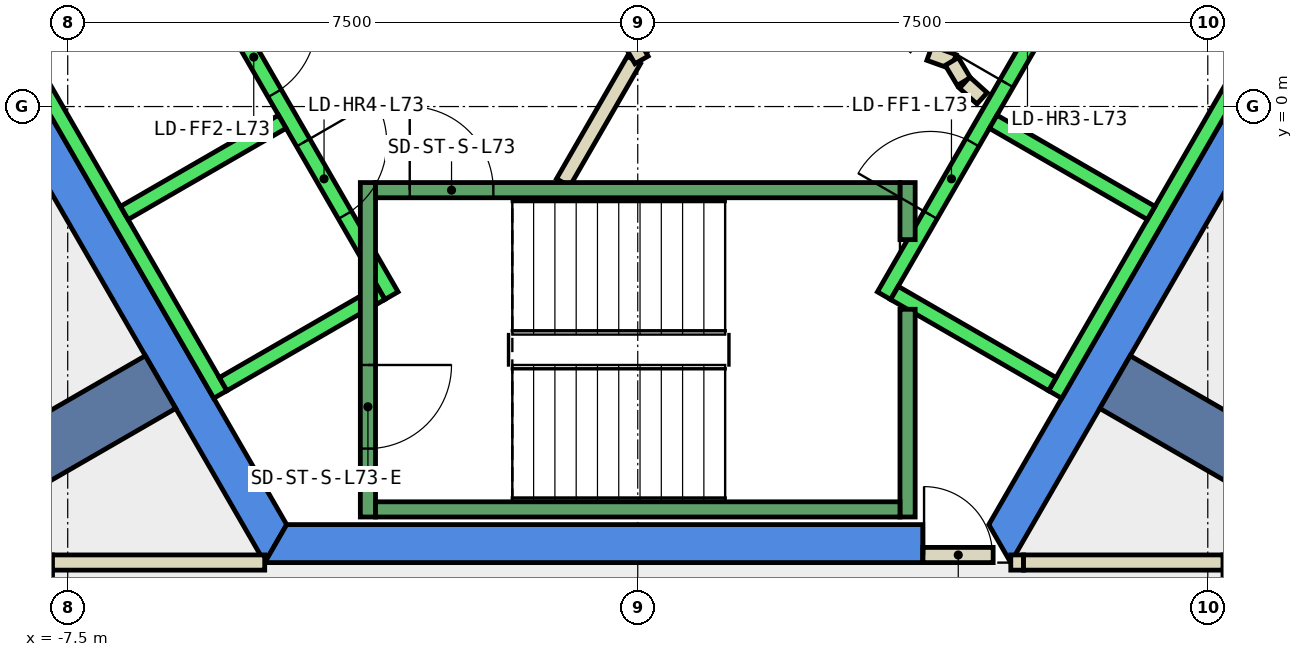
"""IFC4 building model, lengths in metres.
Left out: names, types, materials, properties, quantities, classifications, styles, units other than length and angle.
Written with IfcOpenShell. Run it as: python <this file> out.ifc"""

import sys

from ifc_helpers import new_model, si_unit, direction, frame, frame_2d, origin, place, context, subcontext, project, spatial, polyline, rectangle, outline, extrude, element, fill, save


model = new_model("IFC4")
c1 = context("Model", 3, precision=1e-05, world=origin(), true_north=direction((0.0, 1.0)))
c2 = subcontext(c1, "Body", "Model", "MODEL_VIEW")
j1 = project(units=[si_unit("LENGTHUNIT", "METRE"), si_unit("PLANEANGLEUNIT", "RADIAN")], contexts=[c1])
p1 = place(None, origin())
s1 = spatial("IfcSite", under=j1, at=p1, CompositionType="ELEMENT")
p2 = place(p1, origin())
s2 = spatial("IfcBuilding", under=s1, at=p2, CompositionType="ELEMENT")
p3 = place(p2, frame((0.0, 0.0, 311.6)))
s3 = spatial("IfcBuildingStorey", under=s2, at=p3, CompositionType="ELEMENT", Elevation=311.6)
p4 = place(p3, frame((0.0, 0.0, -0.34)))
e1 = element("IfcWall", 1, at=p4, inside=s3, PredefinedType="SHEAR", context=c2, shape_type="SweptSolid", body=[
    extrude(outline(polyline([(-9.815, 2.5), (-4.907, -6.0), (-4.619, -5.5), (-9.238, 2.5), (-9.815, 2.5)])), origin(), (0.0, 0.0, 1.0), 3.6),
])
p5 = place(p3, frame((0.0, 0.0, -0.34)))
e2 = element("IfcWall", 2, at=p5, inside=s3, PredefinedType="SHEAR", context=c2, shape_type="SweptSolid", body=[
    extrude(outline(polyline([(3.75, -6.0), (3.75, -5.5), (-4.619, -5.5), (-4.907, -6.0), (3.75, -6.0)])), origin(), (0.0, 0.0, 1.0), 3.6),
])
p6 = place(p3, frame((0.0, 0.0, -0.34)))
e3 = element("IfcWall", 3, at=p6, inside=s3, PredefinedType="SHEAR", context=c2, shape_type="SweptSolid", body=[
    extrude(outline(polyline([(4.907, -6.0), (9.815, 2.5), (9.238, 2.5), (4.619, -5.5), (4.907, -6.0)])), origin(), (0.0, 0.0, 1.0), 3.6),
])
for number, where, z_axis, x_axis in (
    (4, (6.279, -3.625, -0.34), (0.0, 0.0, 1.0), (0.866, -0.5, 0.0)),
    (5, (-6.279, -3.625, -0.34), (0.0, 0.0, 1.0), (-0.866, -0.5, 0.0)),
):
    element("IfcWall", number, at=place(p3, frame(where, z_axis=z_axis, x_axis=x_axis)), inside=s3, PredefinedType="SHEAR", context=c2, shape_type="SweptSolid", body=[
        extrude(rectangle(XDim=9.0, YDim=0.8, at=frame_2d((4.5, 0.0))), origin(), (0.0, 0.0, 1.0), 3.6),
    ])
p7 = place(p3, frame((-0.982, -1.0, 0.0), z_axis=(0.0, 0.0, 1.0), x_axis=(0.50024047865, 0.865886518847, 0.0)))
e6 = element("IfcWall", 6, at=p7, inside=s3, PredefinedType="PARTITIONING", context=c2, shape_type="SweptSolid", body=[
    extrude(rectangle(XDim=1.863, YDim=0.2, at=frame_2d((0.931, 0.0))), origin(), (0.0, 0.0, 1.0), 3.26),
])
p8 = place(p3, frame((3.838, 0.702, 0.0), z_axis=(0.0, 0.0, 1.0), x_axis=(0.941035081519, -0.338308993895, 0.0)))
e7 = element("IfcWall", 7, at=p8, inside=s3, PredefinedType="PARTITIONING", context=c2, shape_type="SweptSolid", body=[
    extrude(rectangle(XDim=0.337, YDim=0.2, at=frame_2d((0.168, 0.0))), origin(), (0.0, 0.0, 1.0), 3.26),
])
p9 = place(p3, frame((4.132, 0.593, 0.0), z_axis=(0.0, 0.0, 1.0), x_axis=(0.513561617048, -0.858052717201, 0.0)))
e8 = element("IfcWall", 8, at=p9, inside=s3, PredefinedType="PARTITIONING", context=c2, shape_type="SweptSolid", body=[
    extrude(rectangle(XDim=0.308, YDim=0.2, at=frame_2d((0.154, 0.0))), origin(), (0.0, 0.0, 1.0), 3.26),
])
p10 = place(p3, frame((4.301, 0.315, 0.0), z_axis=(0.0, 0.0, 1.0), x_axis=(0.741798017506, -0.670623367639, 0.0)))
e9 = element("IfcWall", 9, at=p10, inside=s3, PredefinedType="PARTITIONING", context=c2, shape_type="SweptSolid", body=[
    extrude(rectangle(XDim=0.309, YDim=0.2, at=frame_2d((0.154, 0.0))), origin(), (0.0, 0.0, 1.0), 3.26),
])
p11 = place(p3, frame((-2.54, 5.1, 0.0), z_axis=(0.0, 0.0, 1.0), x_axis=(0.499925051871, -0.866068670783, 0.0)))
e10 = element("IfcWall", 10, at=p11, inside=s3, PredefinedType="PARTITIONING", context=c2, shape_type="SweptSolid", body=[
    extrude(rectangle(XDim=5.181, YDim=0.2, at=frame_2d((2.59, 0.0))), origin(), (0.0, 0.0, 1.0), 3.26),
])
p12 = place(p11, frame((1.64, 0.0, 0.0)))
e11 = element("IfcOpeningElement", 11, at=p12, cuts=e10, PredefinedType="OPENING", context=c2, shape_type="SweptSolid", body=[
    extrude(rectangle(XDim=1.0, YDim=2.1, at=frame_2d((0.5, 1.05))), frame((0.0, 0.11, 0.0), z_axis=(0.0, -1.0, 0.0), x_axis=(1.0, 0.0, 0.0)), (0.0, 0.0, 1.0), 0.22),
])
p13 = place(p3, frame((4.908, -5.999, 0.0), z_axis=(0.0, 0.0, 1.0), x_axis=(1.0, 0.0, 0.0)))
e12 = element("IfcWall", 12, at=p13, inside=s3, PredefinedType="PARTITIONING", context=c2, shape_type="SweptSolid", body=[
    extrude(rectangle(XDim=0.168, YDim=0.2, at=frame_2d((0.084, 0.0))), origin(), (0.0, 0.0, 1.0), 2.4),
])
for number, where, z_axis, x_axis in (
    (13, (7.8, -5.899, 0.0), (0.0, 0.0, 1.0), (0.0, -1.0, 0.0)),
    (14, (-7.8, -10.741, 0.0), (0.0, 0.0, 1.0), (0.0, 1.0, 0.0)),
):
    element("IfcWall", number, at=place(p3, frame(where, z_axis=z_axis, x_axis=x_axis)), inside=s3, PredefinedType="PARTITIONING", context=c2, shape_type="SweptSolid", body=[
        extrude(rectangle(XDim=4.842, YDim=0.2, at=frame_2d((2.421, 0.0))), origin(), (0.0, 0.0, 1.0), 3.26),
    ])
p14 = place(p3, frame((-7.7, -5.999, 0.0), z_axis=(0.0, 0.0, 1.0), x_axis=(1.0, 0.0, 0.0)))
e15 = element("IfcWall", 15, at=p14, inside=s3, PredefinedType="PARTITIONING", context=c2, shape_type="SweptSolid", body=[
    extrude(rectangle(XDim=2.792, YDim=0.2, at=frame_2d((1.396, 0.0))), origin(), (0.0, 0.0, 1.0), 3.26),
])
p15 = place(p3, frame((3.75, -5.9, 0.0), z_axis=(0.0, 0.0, 1.0), x_axis=(1.0, 0.0, 0.0)))
e16 = element("IfcWall", 16, at=p15, inside=s3, PredefinedType="PARTITIONING", context=c2, shape_type="SweptSolid", body=[
    extrude(rectangle(XDim=0.926, YDim=0.2, at=frame_2d((0.463, 0.0))), origin(), (0.0, 0.0, 1.0), 2.4),
])
p16 = place(p15, frame((0.017, 0.0, 0.0)))
e17 = element("IfcOpeningElement", 17, at=p16, cuts=e16, PredefinedType="OPENING", context=c2, shape_type="SweptSolid", body=[
    extrude(rectangle(XDim=0.9, YDim=2.1, at=frame_2d((0.45, 1.05))), frame((0.0, 0.11, 0.0), z_axis=(0.0, -1.0, 0.0), x_axis=(1.0, 0.0, 0.0)), (0.0, 0.0, 1.0), 0.22),
])
p17 = place(p3, frame((5.076, -5.999, 0.0), z_axis=(0.0, 0.0, 1.0), x_axis=(1.0, 0.0, 0.0)))
e18 = element("IfcWall", 18, at=p17, inside=s3, PredefinedType="PARTITIONING", context=c2, shape_type="SweptSolid", body=[
    extrude(rectangle(XDim=2.624, YDim=0.2, at=frame_2d((1.312, 0.0))), origin(), (0.0, 0.0, 1.0), 3.26),
])
p18 = place(p3, frame((-5.94, 2.188, 0.0), z_axis=(0.0, 0.0, 1.0), x_axis=(0.500034260056, -0.866005622828, 0.0)))
e19 = element("IfcWall", 19, at=p18, inside=s3, PredefinedType="STANDARD", context=c2, shape_type="SweptSolid", body=[
    extrude(rectangle(XDim=5.399, YDim=0.2, at=frame_2d((2.7, 0.0))), origin(), (0.0, 0.0, 1.0), 3.26),
])
p19 = place(p18, frame((3.075, 0.0, 0.0)))
e20 = element("IfcOpeningElement", 20, at=p19, cuts=e19, PredefinedType="OPENING", context=c2, shape_type="SweptSolid", body=[
    extrude(rectangle(XDim=1.1, YDim=2.1, at=frame_2d((0.55, 1.05))), frame((0.0, 0.11, 0.0), z_axis=(0.0, -1.0, 0.0), x_axis=(1.0, 0.0, 0.0)), (0.0, 0.0, 1.0), 0.22),
])
p20 = place(p18, frame((1.225, 0.0, 0.0)))
e21 = element("IfcOpeningElement", 21, at=p20, cuts=e19, PredefinedType="OPENING", context=c2, shape_type="SweptSolid", body=[
    extrude(rectangle(XDim=1.1, YDim=2.1, at=frame_2d((0.55, 1.05))), frame((0.0, 0.11, 0.0), z_axis=(0.0, -1.0, 0.0), x_axis=(1.0, 0.0, 0.0)), (0.0, 0.0, 1.0), 0.22),
])
p21 = place(p3, frame((-8.192, 0.888, 0.0), z_axis=(0.0, 0.0, 1.0), x_axis=(0.500034260056, -0.866005622828, 0.0)))
e22 = element("IfcWall", 22, at=p21, inside=s3, PredefinedType="STANDARD", context=c2, shape_type="SweptSolid", body=[
    extrude(rectangle(XDim=5.399, YDim=0.2, at=frame_2d((2.7, 0.0))), origin(), (0.0, 0.0, 1.0), 3.26),
])
p22 = place(p3, frame((-4.677, -0.2, 0.0), z_axis=(0.0, 0.0, 1.0), x_axis=(-0.865973769406, -0.500089422704, 0.0)))
e23 = element("IfcWall", 23, at=p22, inside=s3, PredefinedType="STANDARD", context=c2, shape_type="SweptSolid", body=[
    extrude(rectangle(XDim=2.399, YDim=0.2, at=frame_2d((1.2, 0.0))), origin(), (0.0, 0.0, 1.0), 3.26),
])
p23 = place(p3, frame((-3.377, -2.452, 0.0), z_axis=(0.0, 0.0, 1.0), x_axis=(-0.865955154139, -0.50012165622, 0.0)))
e24 = element("IfcWall", 24, at=p23, inside=s3, PredefinedType="STANDARD", context=c2, shape_type="SweptSolid", body=[
    extrude(rectangle(XDim=2.4, YDim=0.2, at=frame_2d((1.2, 0.0))), origin(), (0.0, 0.0, 1.0), 3.26),
])
p24 = place(p3, frame((3.24, -2.488, 0.0), z_axis=(0.0, 0.0, 1.0), x_axis=(0.500034260056, 0.866005622828, 0.0)))
e25 = element("IfcWall", 25, at=p24, inside=s3, PredefinedType="STANDARD", context=c2, shape_type="SweptSolid", body=[
    extrude(rectangle(XDim=5.399, YDim=0.2, at=frame_2d((2.7, 0.0))), origin(), (0.0, 0.0, 1.0), 3.26),
])
p25 = place(p24, frame((3.225, 0.0, 0.0)))
e26 = element("IfcOpeningElement", 26, at=p25, cuts=e25, PredefinedType="OPENING", context=c2, shape_type="SweptSolid", body=[
    extrude(rectangle(XDim=1.1, YDim=2.1, at=frame_2d((0.55, 1.05))), frame((0.0, 0.11, 0.0), z_axis=(0.0, -1.0, 0.0), x_axis=(1.0, 0.0, 0.0)), (0.0, 0.0, 1.0), 0.22),
])
p26 = place(p24, frame((1.225, 0.0, 0.0)))
e27 = element("IfcOpeningElement", 27, at=p26, cuts=e25, PredefinedType="OPENING", context=c2, shape_type="SweptSolid", body=[
    extrude(rectangle(XDim=1.1, YDim=2.1, at=frame_2d((0.55, 1.05))), frame((0.0, 0.11, 0.0), z_axis=(0.0, -1.0, 0.0), x_axis=(1.0, 0.0, 0.0)), (0.0, 0.0, 1.0), 0.22),
])
p27 = place(p3, frame((5.492, -3.788, 0.0), z_axis=(0.0, 0.0, 1.0), x_axis=(0.500034260056, 0.866005622828, 0.0)))
e28 = element("IfcWall", 28, at=p27, inside=s3, PredefinedType="STANDARD", context=c2, shape_type="SweptSolid", body=[
    extrude(rectangle(XDim=5.399, YDim=0.2, at=frame_2d((2.7, 0.0))), origin(), (0.0, 0.0, 1.0), 3.26),
])
p28 = place(p3, frame((3.377, -2.452, 0.0), z_axis=(0.0, 0.0, 1.0), x_axis=(0.865955154139, -0.50012165622, 0.0)))
e29 = element("IfcWall", 29, at=p28, inside=s3, PredefinedType="STANDARD", context=c2, shape_type="SweptSolid", body=[
    extrude(rectangle(XDim=2.4, YDim=0.2, at=frame_2d((1.2, 0.0))), origin(), (0.0, 0.0, 1.0), 3.26),
])
p29 = place(p3, frame((4.677, -0.2, 0.0), z_axis=(0.0, 0.0, 1.0), x_axis=(0.865973769406, -0.500089422704, 0.0)))
e30 = element("IfcWall", 30, at=p29, inside=s3, PredefinedType="STANDARD", context=c2, shape_type="SweptSolid", body=[
    extrude(rectangle(XDim=2.399, YDim=0.2, at=frame_2d((1.2, 0.0))), origin(), (0.0, 0.0, 1.0), 3.26),
])
p30 = place(p3, frame((-3.55, -1.0, 0.0), z_axis=(0.0, 0.0, 1.0), x_axis=(0.0, -1.0, 0.0)))
e31 = element("IfcWall", 31, at=p30, inside=s3, PredefinedType="STANDARD", context=c2, shape_type="SweptSolid", body=[
    extrude(rectangle(XDim=4.4, YDim=0.2, at=frame_2d((2.2, 0.0))), origin(), (0.0, 0.0, 1.0), 3.26),
])
p31 = place(p30, frame((2.4, 0.0, 0.0)))
e32 = element("IfcOpeningElement", 32, at=p31, cuts=e31, PredefinedType="OPENING", context=c2, shape_type="SweptSolid", body=[
    extrude(rectangle(XDim=1.1, YDim=2.2, at=frame_2d((0.55, 1.1))), frame((0.0, 0.11, 0.0), z_axis=(0.0, -1.0, 0.0), x_axis=(1.0, 0.0, 0.0)), (0.0, 0.0, 1.0), 0.22),
])
p32 = place(p3, frame((3.55, -2.667, 0.0), z_axis=(0.0, 0.0, 1.0), x_axis=(0.0, -1.0, 0.0)))
e33 = element("IfcWall", 33, at=p32, inside=s3, PredefinedType="STANDARD", context=c2, shape_type="SweptSolid", body=[
    extrude(rectangle(XDim=2.733, YDim=0.2, at=frame_2d((1.366, 0.0))), origin(), (0.0, 0.0, 1.0), 3.26),
])
p33 = place(p3, frame((3.55, -1.0, 0.0), z_axis=(0.0, 0.0, 1.0), x_axis=(0.0, -1.0, 0.0)))
e34 = element("IfcWall", 34, at=p33, inside=s3, PredefinedType="STANDARD", context=c2, shape_type="SweptSolid", body=[
    extrude(rectangle(XDim=0.751, YDim=0.2, at=frame_2d((0.375, 0.0))), origin(), (0.0, 0.0, 1.0), 3.26),
])
p34 = place(p3, frame((-3.45, -1.1, 0.0), z_axis=(0.0, 0.0, 1.0), x_axis=(1.0, 0.0, 0.0)))
e35 = element("IfcWall", 35, at=p34, inside=s3, PredefinedType="STANDARD", context=c2, shape_type="SweptSolid", body=[
    extrude(rectangle(XDim=6.9, YDim=0.2, at=frame_2d((3.45, 0.0))), origin(), (0.0, 0.0, 1.0), 3.26),
])
p35 = place(p34, frame((0.45, 0.0, 0.0)))
e36 = element("IfcOpeningElement", 36, at=p35, cuts=e35, PredefinedType="OPENING", context=c2, shape_type="SweptSolid", body=[
    extrude(rectangle(XDim=1.1, YDim=2.2, at=frame_2d((0.55, 1.1))), frame((0.0, 0.11, 0.0), z_axis=(0.0, -1.0, 0.0), x_axis=(1.0, 0.0, 0.0)), (0.0, 0.0, 1.0), 0.22),
])
p36 = place(p3, frame((-3.45, -5.3, 0.0), z_axis=(0.0, 0.0, 1.0), x_axis=(1.0, 0.0, 0.0)))
e37 = element("IfcWall", 37, at=p36, inside=s3, PredefinedType="STANDARD", context=c2, shape_type="SweptSolid", body=[
    extrude(rectangle(XDim=6.9, YDim=0.2, at=frame_2d((3.45, 0.0))), origin(), (0.0, 0.0, 1.0), 3.26),
])
p37 = place(p16, origin())
e38 = element("IfcDoor", 38, at=p37, inside=s3, OperationType="SINGLE_SWING_LEFT", PredefinedType="DOOR", context=c2, shape_type="SweptSolid", body=[
    extrude(rectangle(XDim=0.9, YDim=2.1, at=frame_2d((0.45, 1.05))), frame((0.0, 0.025, 0.0), z_axis=(0.0, -1.0, 0.0), x_axis=(1.0, 0.0, 0.0)), (0.0, 0.0, 1.0), 0.05),
])
fill(e17, e38)
p38 = place(p25, origin())
e39 = element("IfcDoor", 39, at=p38, inside=s3, OperationType="SLIDING_TO_LEFT", PredefinedType="DOOR", context=c2, shape_type="SweptSolid", body=[
    extrude(rectangle(XDim=1.1, YDim=2.1, at=frame_2d((0.55, 1.05))), frame((0.0, 0.025, 0.0), z_axis=(0.0, -1.0, 0.0), x_axis=(1.0, 0.0, 0.0)), (0.0, 0.0, 1.0), 0.05),
])
fill(e26, e39)
p39 = place(p19, origin())
e40 = element("IfcDoor", 40, at=p39, inside=s3, OperationType="SLIDING_TO_LEFT", PredefinedType="DOOR", context=c2, shape_type="SweptSolid", body=[
    extrude(rectangle(XDim=1.1, YDim=2.1, at=frame_2d((0.55, 1.05))), frame((0.0, 0.025, 0.0), z_axis=(0.0, -1.0, 0.0), x_axis=(1.0, 0.0, 0.0)), (0.0, 0.0, 1.0), 0.05),
])
fill(e20, e40)
p40 = place(p26, origin())
e41 = element("IfcDoor", 41, at=p40, inside=s3, OperationType="SLIDING_TO_LEFT", PredefinedType="DOOR", context=c2, shape_type="SweptSolid", body=[
    extrude(rectangle(XDim=1.1, YDim=2.1, at=frame_2d((0.55, 1.05))), frame((0.0, 0.025, 0.0), z_axis=(0.0, -1.0, 0.0), x_axis=(1.0, 0.0, 0.0)), (0.0, 0.0, 1.0), 0.05),
])
fill(e27, e41)
p41 = place(p20, origin())
e42 = element("IfcDoor", 42, at=p41, inside=s3, OperationType="SLIDING_TO_LEFT", PredefinedType="DOOR", context=c2, shape_type="SweptSolid", body=[
    extrude(rectangle(XDim=1.1, YDim=2.1, at=frame_2d((0.55, 1.05))), frame((0.0, 0.025, 0.0), z_axis=(0.0, -1.0, 0.0), x_axis=(1.0, 0.0, 0.0)), (0.0, 0.0, 1.0), 0.05),
])
fill(e21, e42)
p42 = place(p35, origin())
e43 = element("IfcDoor", 43, at=p42, inside=s3, OperationType="SINGLE_SWING_LEFT", PredefinedType="DOOR", context=c2, shape_type="SweptSolid", body=[
    extrude(rectangle(XDim=1.1, YDim=2.2, at=frame_2d((0.55, 1.1))), frame((0.0, 0.025, 0.0), z_axis=(0.0, -1.0, 0.0), x_axis=(1.0, 0.0, 0.0)), (0.0, 0.0, 1.0), 0.05),
])
fill(e36, e43)
p43 = place(p31, origin())
e44 = element("IfcDoor", 44, at=p43, inside=s3, OperationType="SINGLE_SWING_LEFT", PredefinedType="DOOR", context=c2, shape_type="SweptSolid", body=[
    extrude(rectangle(XDim=1.1, YDim=2.2, at=frame_2d((0.55, 1.1))), frame((0.0, 0.025, 0.0), z_axis=(0.0, -1.0, 0.0), x_axis=(1.0, 0.0, 0.0)), (0.0, 0.0, 1.0), 0.05),
])
fill(e32, e44)
save(model, sys.argv[1])
